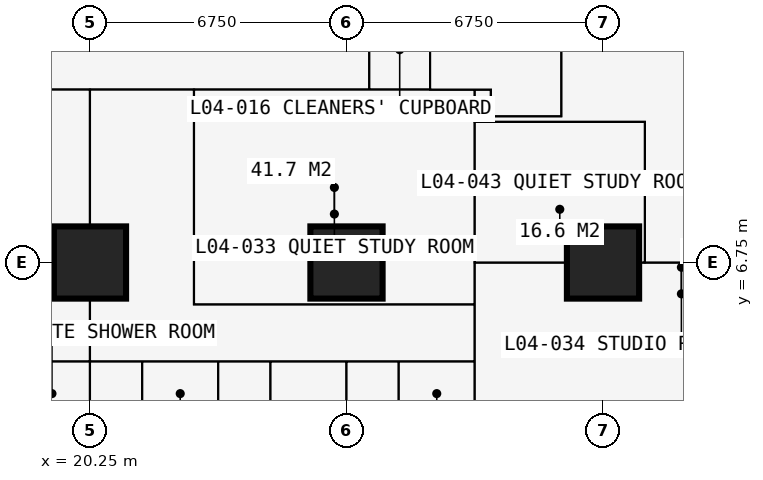
"""IFC4 building model, lengths in metres.
Left out: names, types, materials, properties, quantities, classifications, styles, units other than length and angle.
Written with IfcOpenShell. Run it as: python <this file> out.ifc"""

import sys

from ifc_helpers import new_model, si_unit, direction, frame, frame_2d, origin, origin_2d, place, context, subcontext, project, spatial, rectangle, extrude, element, fill, save


model = new_model("IFC4")
c1 = context("Model", 3, precision=1e-05, world=origin(), true_north=direction((0.0, 1.0)))
c2 = subcontext(c1, "Body", "Model", "MODEL_VIEW")
j1 = project(units=[si_unit("LENGTHUNIT", "METRE"), si_unit("PLANEANGLEUNIT", "RADIAN")], contexts=[c1])
p1 = place(None, origin())
s1 = spatial("IfcSite", under=j1, at=p1, CompositionType="ELEMENT")
p2 = place(p1, origin())
s2 = spatial("IfcBuilding", under=s1, at=p2, CompositionType="ELEMENT")
p3 = place(p2, frame((0.0, 0.0, 18.0)))
s3 = spatial("IfcBuildingStorey", under=s2, at=p3, CompositionType="ELEMENT", Elevation=18.0)
for number, where, z_axis, x_axis in (
    (1, (20.25, 6.75, 0.0), (0.0, 0.0, 1.0), (1.0, 0.0, 0.0)),
    (2, (27.0, 6.75, 0.0), (0.0, 0.0, 1.0), (1.0, 0.0, 0.0)),
    (3, (33.75, 6.75, 0.0), (0.0, 0.0, 1.0), (1.0, 0.0, 0.0)),
):
    element("IfcColumn", number, at=place(p3, frame(where, z_axis=z_axis, x_axis=x_axis)), inside=s3, PredefinedType="COLUMN", context=c2, shape_type="SweptSolid", body=[
        extrude(rectangle(XDim=1.9, YDim=1.9, at=origin_2d()), origin(), (0.0, 0.0, 1.0), 3.6),
    ])
p4 = place(p3, frame((6.75, 4.15, 0.0), z_axis=(0.0, 0.0, 1.0), x_axis=(1.0, 0.0, 0.0)))
e4 = element("IfcWall", 4, at=p4, inside=s3, PredefinedType="PARTITIONING", context=c2, shape_type="SweptSolid", body=[
    extrude(rectangle(XDim=23.625, YDim=0.1, at=frame_2d((11.812, 0.0))), origin(), (0.0, 0.0, 1.0), 3.375),
])
p5 = place(p4, frame((1.2, 0.0, 0.0)))
e5 = element("IfcOpeningElement", 5, at=p5, cuts=e4, PredefinedType="OPENING", context=c2, shape_type="SweptSolid", body=[
    extrude(rectangle(XDim=1.0, YDim=2.2, at=frame_2d((0.5, 1.1))), frame((0.0, 0.06, 0.0), z_axis=(0.0, -1.0, 0.0), x_axis=(1.0, 0.0, 0.0)), (0.0, 0.0, 1.0), 0.12),
])
p6 = place(p4, frame((3.575, 0.0, 0.0)))
e6 = element("IfcOpeningElement", 6, at=p6, cuts=e4, PredefinedType="OPENING", context=c2, shape_type="SweptSolid", body=[
    extrude(rectangle(XDim=0.95, YDim=2.2, at=frame_2d((0.475, 1.1))), frame((0.0, 0.06, 0.0), z_axis=(0.0, -1.0, 0.0), x_axis=(1.0, 0.0, 0.0)), (0.0, 0.0, 1.0), 0.12),
])
p7 = place(p4, frame((7.0, 0.0, 0.0)))
e7 = element("IfcOpeningElement", 7, at=p7, cuts=e4, PredefinedType="OPENING", context=c2, shape_type="SweptSolid", body=[
    extrude(rectangle(XDim=0.95, YDim=2.2, at=frame_2d((0.475, 1.1))), frame((0.0, 0.06, 0.0), z_axis=(0.0, -1.0, 0.0), x_axis=(1.0, 0.0, 0.0)), (0.0, 0.0, 1.0), 0.12),
])
p8 = place(p4, frame((10.375, 0.0, 0.0)))
e8 = element("IfcOpeningElement", 8, at=p8, cuts=e4, PredefinedType="OPENING", context=c2, shape_type="SweptSolid", body=[
    extrude(rectangle(XDim=0.95, YDim=2.2, at=frame_2d((0.475, 1.1))), frame((0.0, 0.06, 0.0), z_axis=(0.0, -1.0, 0.0), x_axis=(1.0, 0.0, 0.0)), (0.0, 0.0, 1.0), 0.12),
])
p9 = place(p4, frame((13.7, 0.0, 0.0)))
e9 = element("IfcOpeningElement", 9, at=p9, cuts=e4, PredefinedType="OPENING", context=c2, shape_type="SweptSolid", body=[
    extrude(rectangle(XDim=0.95, YDim=2.2, at=frame_2d((0.475, 1.1))), frame((0.0, 0.06, 0.0), z_axis=(0.0, -1.0, 0.0), x_axis=(1.0, 0.0, 0.0)), (0.0, 0.0, 1.0), 0.12),
])
p10 = place(p4, frame((17.125, 0.0, 0.0)))
e10 = element("IfcOpeningElement", 10, at=p10, cuts=e4, PredefinedType="OPENING", context=c2, shape_type="SweptSolid", body=[
    extrude(rectangle(XDim=0.95, YDim=2.2, at=frame_2d((0.475, 1.1))), frame((0.0, 0.06, 0.0), z_axis=(0.0, -1.0, 0.0), x_axis=(1.0, 0.0, 0.0)), (0.0, 0.0, 1.0), 0.12),
])
p11 = place(p4, frame((20.5, 0.0, 0.0)))
e11 = element("IfcOpeningElement", 11, at=p11, cuts=e4, PredefinedType="OPENING", context=c2, shape_type="SweptSolid", body=[
    extrude(rectangle(XDim=0.95, YDim=2.2, at=frame_2d((0.475, 1.1))), frame((0.0, 0.06, 0.0), z_axis=(0.0, -1.0, 0.0), x_axis=(1.0, 0.0, 0.0)), (0.0, 0.0, 1.0), 0.12),
])
p12 = place(p3, frame((10.125, 11.3, 0.0), z_axis=(0.0, 0.0, 1.0), x_axis=(1.0, 0.0, 0.0)))
e12 = element("IfcWall", 12, at=p12, inside=s3, PredefinedType="PARTITIONING", context=c2, shape_type="SweptSolid", body=[
    extrude(rectangle(XDim=20.675, YDim=0.15, at=frame_2d((10.337, 0.0))), origin(), (0.0, 0.0, 1.0), 3.375),
])
p13 = place(p12, frame((8.375, 0.0, 0.0)))
e13 = element("IfcOpeningElement", 13, at=p13, cuts=e12, PredefinedType="OPENING", context=c2, shape_type="SweptSolid", body=[
    extrude(rectangle(XDim=1.0, YDim=2.2, at=frame_2d((0.5, 1.1))), frame((0.0, 0.085, 0.0), z_axis=(0.0, -1.0, 0.0), x_axis=(1.0, 0.0, 0.0)), (0.0, 0.0, 1.0), 0.17),
])
p14 = place(p12, frame((10.975, 0.0, 0.0)))
e14 = element("IfcOpeningElement", 14, at=p14, cuts=e12, PredefinedType="OPENING", context=c2, shape_type="SweptSolid", body=[
    extrude(rectangle(XDim=1.0, YDim=2.2, at=frame_2d((0.5, 1.1))), frame((0.0, 0.085, 0.0), z_axis=(0.0, -1.0, 0.0), x_axis=(1.0, 0.0, 0.0)), (0.0, 0.0, 1.0), 0.17),
])
p15 = place(p12, frame((3.925, 0.0, 0.0)))
e15 = element("IfcOpeningElement", 15, at=p15, cuts=e12, PredefinedType="OPENING", context=c2, shape_type="SweptSolid", body=[
    extrude(rectangle(XDim=0.95, YDim=2.2, at=frame_2d((0.475, 1.1))), frame((0.0, 0.085, 0.0), z_axis=(0.0, -1.0, 0.0), x_axis=(1.0, 0.0, 0.0)), (0.0, 0.0, 1.0), 0.17),
])
p16 = place(p3, frame((20.25, -0.734, 0.0), z_axis=(0.0, 0.0, 1.0), x_axis=(0.0, 1.0, 0.0)))
e16 = element("IfcWall", 16, at=p16, inside=s3, PredefinedType="PARTITIONING", context=c2, shape_type="SweptSolid", body=[
    extrude(rectangle(XDim=12.034, YDim=0.15, at=frame_2d((6.017, 0.0))), origin(), (0.0, 0.0, 1.0), 2.61),
])
p17 = place(p3, frame((21.625, 1.95, 0.0), z_axis=(0.0, 0.0, 1.0), x_axis=(0.0, 1.0, 0.0)))
e17 = element("IfcWall", 17, at=p17, inside=s3, PredefinedType="PARTITIONING", context=c2, shape_type="SweptSolid", body=[
    extrude(rectangle(XDim=2.2, YDim=0.1, at=frame_2d((1.1, 0.0))), origin(), (0.0, 0.0, 1.0), 3.375),
])
p18 = place(p17, frame((0.65, 0.0, 0.0)))
e18 = element("IfcOpeningElement", 18, at=p18, cuts=e17, PredefinedType="OPENING", context=c2, shape_type="SweptSolid", body=[
    extrude(rectangle(XDim=0.9, YDim=2.2, at=frame_2d((0.45, 1.1))), frame((0.0, 0.06, 0.0), z_axis=(0.0, -1.0, 0.0), x_axis=(1.0, 0.0, 0.0)), (0.0, 0.0, 1.0), 0.12),
])
p19 = place(p3, frame((22.988, 5.65, 0.0), z_axis=(0.0, 0.0, 1.0), x_axis=(1.0, 0.0, 0.0)))
e19 = element("IfcWall", 19, at=p19, inside=s3, PredefinedType="PARTITIONING", context=c2, shape_type="SweptSolid", body=[
    extrude(rectangle(XDim=7.387, YDim=0.15, at=frame_2d((3.694, 0.0))), origin(), (0.0, 0.0, 1.0), 3.375),
])
p20 = place(p19, frame((2.1, 0.0, 0.0)))
e20 = element("IfcOpeningElement", 20, at=p20, cuts=e19, PredefinedType="OPENING", context=c2, shape_type="SweptSolid", body=[
    extrude(rectangle(XDim=0.95, YDim=2.2, at=frame_2d((0.475, 1.1))), frame((0.0, 0.085, 0.0), z_axis=(0.0, -1.0, 0.0), x_axis=(1.0, 0.0, 0.0)), (0.0, 0.0, 1.0), 0.17),
])
p21 = place(p3, frame((22.988, 5.65, 0.0), z_axis=(0.0, 0.0, 1.0), x_axis=(0.0, 1.0, 0.0)))
e21 = element("IfcWall", 21, at=p21, inside=s3, PredefinedType="PARTITIONING", context=c2, shape_type="SweptSolid", body=[
    extrude(rectangle(XDim=5.65, YDim=0.15, at=frame_2d((2.825, 0.0))), origin(), (0.0, 0.0, 1.0), 3.375),
])
p22 = place(p3, frame((23.625, -0.734, 0.0), z_axis=(0.0, 0.0, 1.0), x_axis=(0.0, 1.0, 0.0)))
e22 = element("IfcWall", 22, at=p22, inside=s3, PredefinedType="PARTITIONING", context=c2, shape_type="SweptSolid", body=[
    extrude(rectangle(XDim=4.884, YDim=0.175, at=frame_2d((2.442, 0.0))), origin(), (0.0, 0.0, 1.0), 3.375),
])
p23 = place(p3, frame((25.0, 1.95, 0.0), z_axis=(0.0, 0.0, 1.0), x_axis=(0.0, 1.0, 0.0)))
e23 = element("IfcWall", 23, at=p23, inside=s3, PredefinedType="PARTITIONING", context=c2, shape_type="SweptSolid", body=[
    extrude(rectangle(XDim=2.2, YDim=0.1, at=frame_2d((1.1, 0.0))), origin(), (0.0, 0.0, 1.0), 3.375),
])
p24 = place(p23, frame((0.65, 0.0, 0.0)))
e24 = element("IfcOpeningElement", 24, at=p24, cuts=e23, PredefinedType="OPENING", context=c2, shape_type="SweptSolid", body=[
    extrude(rectangle(XDim=0.9, YDim=2.2, at=frame_2d((0.45, 1.1))), frame((0.0, 0.06, 0.0), z_axis=(0.0, -1.0, 0.0), x_axis=(1.0, 0.0, 0.0)), (0.0, 0.0, 1.0), 0.12),
])
p25 = place(p3, frame((27.0, -0.734, 0.0), z_axis=(0.0, 0.0, 1.0), x_axis=(0.0, 1.0, 0.0)))
e25 = element("IfcWall", 25, at=p25, inside=s3, PredefinedType="PARTITIONING", context=c2, shape_type="SweptSolid", body=[
    extrude(rectangle(XDim=4.884, YDim=0.175, at=frame_2d((2.442, 0.0))), origin(), (0.0, 0.0, 1.0), 2.61),
])
p26 = place(p3, frame((27.6, 11.3, 0.0), z_axis=(0.0, 0.0, 1.0), x_axis=(0.0, 1.0, 0.0)))
e26 = element("IfcWall", 26, at=p26, inside=s3, PredefinedType="PARTITIONING", context=c2, shape_type="SweptSolid", body=[
    extrude(rectangle(XDim=1.6, YDim=0.15, at=frame_2d((0.8, 0.0))), origin(), (0.0, 0.0, 1.0), 3.375),
])
p27 = place(p26, frame((0.3, 0.0, 0.0)))
e27 = element("IfcOpeningElement", 27, at=p27, cuts=e26, PredefinedType="OPENING", context=c2, shape_type="SweptSolid", body=[
    extrude(rectangle(XDim=0.95, YDim=2.2, at=frame_2d((0.475, 1.1))), frame((0.0, 0.085, 0.0), z_axis=(0.0, -1.0, 0.0), x_axis=(1.0, 0.0, 0.0)), (0.0, 0.0, 1.0), 0.17),
])
p28 = place(p3, frame((28.375, 1.95, 0.0), z_axis=(0.0, 0.0, 1.0), x_axis=(0.0, 1.0, 0.0)))
e28 = element("IfcWall", 28, at=p28, inside=s3, PredefinedType="PARTITIONING", context=c2, shape_type="SweptSolid", body=[
    extrude(rectangle(XDim=2.2, YDim=0.1, at=frame_2d((1.1, 0.0))), origin(), (0.0, 0.0, 1.0), 3.375),
])
p29 = place(p28, frame((0.65, 0.0, 0.0)))
e29 = element("IfcOpeningElement", 29, at=p29, cuts=e28, PredefinedType="OPENING", context=c2, shape_type="SweptSolid", body=[
    extrude(rectangle(XDim=0.9, YDim=2.2, at=frame_2d((0.45, 1.1))), frame((0.0, 0.06, 0.0), z_axis=(0.0, -1.0, 0.0), x_axis=(1.0, 0.0, 0.0)), (0.0, 0.0, 1.0), 0.12),
])
p30 = place(p3, frame((29.2, 11.3, 0.0), z_axis=(0.0, 0.0, 1.0), x_axis=(0.0, 1.0, 0.0)))
e30 = element("IfcWall", 30, at=p30, inside=s3, PredefinedType="PARTITIONING", context=c2, shape_type="SweptSolid", body=[
    extrude(rectangle(XDim=17.9, YDim=0.2, at=frame_2d((8.95, 0.0))), origin(), (0.0, 0.0, 1.0), 3.375),
])
p31 = place(p30, frame((8.35, 0.0, 0.0)))
e31 = element("IfcOpeningElement", 31, at=p31, cuts=e30, PredefinedType="OPENING", context=c2, shape_type="SweptSolid", body=[
    extrude(rectangle(XDim=1.2, YDim=2.2, at=frame_2d((0.6, 1.1))), frame((0.0, 0.11, 0.0), z_axis=(0.0, -1.0, 0.0), x_axis=(1.0, 0.0, 0.0)), (0.0, 0.0, 1.0), 0.22),
])
p32 = place(p3, frame((30.375, -0.734, 0.0), z_axis=(0.0, 0.0, 1.0), x_axis=(0.0, 1.0, 0.0)))
e32 = element("IfcWall", 32, at=p32, inside=s3, PredefinedType="PARTITIONING", context=c2, shape_type="SweptSolid", body=[
    extrude(rectangle(XDim=12.034, YDim=0.15, at=frame_2d((6.017, 0.0))), origin(), (0.0, 0.0, 1.0), 3.375),
])
p33 = place(p32, frame((5.134, 0.0, 0.0)))
e33 = element("IfcOpeningElement", 33, at=p33, cuts=e32, PredefinedType="OPENING", context=c2, shape_type="SweptSolid", body=[
    extrude(rectangle(XDim=1.0, YDim=2.2, at=frame_2d((0.5, 1.1))), frame((0.0, 0.085, 0.0), z_axis=(0.0, -1.0, 0.0), x_axis=(1.0, 0.0, 0.0)), (0.0, 0.0, 1.0), 0.17),
])
p34 = place(p3, frame((30.375, 6.75, 0.0), z_axis=(0.0, 0.0, 1.0), x_axis=(1.0, 0.0, 0.0)))
e34 = element("IfcWall", 34, at=p34, inside=s3, PredefinedType="PARTITIONING", context=c2, shape_type="SweptSolid", body=[
    extrude(rectangle(XDim=5.975, YDim=0.15, at=frame_2d((2.988, 0.0))), origin(), (0.0, 0.0, 1.0), 2.877),
])
p35 = place(p3, frame((30.375, 10.45, 0.0), z_axis=(0.0, 0.0, 1.0), x_axis=(1.0, 0.0, 0.0)))
e35 = element("IfcWall", 35, at=p35, inside=s3, PredefinedType="PARTITIONING", context=c2, shape_type="SweptSolid", body=[
    extrude(rectangle(XDim=4.475, YDim=0.15, at=frame_2d((2.238, 0.0))), origin(), (0.0, 0.0, 1.0), 3.375),
])
p36 = place(p35, frame((2.35, 0.0, 0.0)))
e36 = element("IfcOpeningElement", 36, at=p36, cuts=e35, PredefinedType="OPENING", context=c2, shape_type="SweptSolid", body=[
    extrude(rectangle(XDim=0.95, YDim=2.2, at=frame_2d((0.475, 1.1))), frame((0.0, 0.085, 0.0), z_axis=(0.0, -1.0, 0.0), x_axis=(1.0, 0.0, 0.0)), (0.0, 0.0, 1.0), 0.17),
])
p37 = place(p3, frame((30.8, 10.6, 0.0), z_axis=(0.0, 0.0, 1.0), x_axis=(0.0, 1.0, 0.0)))
e37 = element("IfcWall", 37, at=p37, inside=s3, PredefinedType="PARTITIONING", context=c2, shape_type="SweptSolid", body=[
    extrude(rectangle(XDim=0.7, YDim=0.15, at=frame_2d((0.35, 0.0))), origin(), (0.0, 0.0, 1.0), 3.375),
])
p38 = place(p3, frame((30.8, 10.6, 0.0), z_axis=(0.0, 0.0, 1.0), x_axis=(1.0, 0.0, 0.0)))
e38 = element("IfcWall", 38, at=p38, inside=s3, PredefinedType="PARTITIONING", context=c2, shape_type="SweptSolid", body=[
    extrude(rectangle(XDim=1.85, YDim=0.15, at=frame_2d((0.925, 0.0))), origin(), (0.0, 0.0, 1.0), 3.375),
])
p39 = place(p3, frame((32.65, 10.6, 0.0), z_axis=(0.0, 0.0, 1.0), x_axis=(0.0, 1.0, 0.0)))
e39 = element("IfcWall", 39, at=p39, inside=s3, PredefinedType="SHEAR", context=c2, shape_type="SweptSolid", body=[
    extrude(rectangle(XDim=9.3, YDim=0.1, at=frame_2d((4.65, 0.0))), origin(), (0.0, 0.0, 1.0), 3.375),
])
p40 = place(p39, frame((0.5, 0.0, 0.0)))
e40 = element("IfcOpeningElement", 40, at=p40, cuts=e39, PredefinedType="OPENING", context=c2, shape_type="SweptSolid", body=[
    extrude(rectangle(XDim=1.0, YDim=2.2, at=frame_2d((0.5, 1.1))), frame((0.0, 0.06, 0.0), z_axis=(0.0, -1.0, 0.0), x_axis=(1.0, 0.0, 0.0)), (0.0, 0.0, 1.0), 0.12),
])
p41 = place(p3, frame((34.85, 6.75, 0.0), z_axis=(0.0, 0.0, 1.0), x_axis=(0.0, 1.0, 0.0)))
e41 = element("IfcWall", 41, at=p41, inside=s3, PredefinedType="PARTITIONING", context=c2, shape_type="SweptSolid", body=[
    extrude(rectangle(XDim=3.7, YDim=0.15, at=frame_2d((1.85, 0.0))), origin(), (0.0, 0.0, 1.0), 3.375),
])
p42 = place(p27, origin())
e42 = element("IfcDoor", 42, at=p42, inside=s3, OperationType="SINGLE_SWING_LEFT", PredefinedType="DOOR", context=c2, shape_type="SweptSolid", body=[
    extrude(rectangle(XDim=0.95, YDim=2.2, at=frame_2d((0.475, 1.1))), frame((0.0, 0.025, 0.0), z_axis=(0.0, -1.0, 0.0), x_axis=(1.0, 0.0, 0.0)), (0.0, 0.0, 1.0), 0.05),
])
fill(e27, e42)
p43 = place(p13, origin())
e43 = element("IfcDoor", 43, at=p43, inside=s3, OperationType="SINGLE_SWING_LEFT", PredefinedType="DOOR", context=c2, shape_type="SweptSolid", body=[
    extrude(rectangle(XDim=1.0, YDim=2.2, at=frame_2d((0.5, 1.1))), frame((0.0, 0.025, 0.0), z_axis=(0.0, -1.0, 0.0), x_axis=(1.0, 0.0, 0.0)), (0.0, 0.0, 1.0), 0.05),
])
fill(e13, e43)
p44 = place(p9, origin())
e44 = element("IfcDoor", 44, at=p44, inside=s3, OperationType="SINGLE_SWING_LEFT", PredefinedType="DOOR", context=c2, shape_type="SweptSolid", body=[
    extrude(rectangle(XDim=0.95, YDim=2.2, at=frame_2d((0.475, 1.1))), frame((0.0, 0.025, 0.0), z_axis=(0.0, -1.0, 0.0), x_axis=(1.0, 0.0, 0.0)), (0.0, 0.0, 1.0), 0.05),
])
fill(e9, e44)
p45 = place(p18, origin())
e45 = element("IfcDoor", 45, at=p45, inside=s3, OperationType="SINGLE_SWING_RIGHT", PredefinedType="DOOR", context=c2, shape_type="SweptSolid", body=[
    extrude(rectangle(XDim=0.9, YDim=2.2, at=frame_2d((0.45, 1.1))), frame((0.0, 0.025, 0.0), z_axis=(0.0, -1.0, 0.0), x_axis=(1.0, 0.0, 0.0)), (0.0, 0.0, 1.0), 0.05),
])
fill(e18, e45)
p46 = place(p10, origin())
e46 = element("IfcDoor", 46, at=p46, inside=s3, OperationType="SINGLE_SWING_LEFT", PredefinedType="DOOR", context=c2, shape_type="SweptSolid", body=[
    extrude(rectangle(XDim=0.95, YDim=2.2, at=frame_2d((0.475, 1.1))), frame((0.0, 0.025, 0.0), z_axis=(0.0, -1.0, 0.0), x_axis=(1.0, 0.0, 0.0)), (0.0, 0.0, 1.0), 0.05),
])
fill(e10, e46)
p47 = place(p24, origin())
e47 = element("IfcDoor", 47, at=p47, inside=s3, OperationType="SINGLE_SWING_RIGHT", PredefinedType="DOOR", context=c2, shape_type="SweptSolid", body=[
    extrude(rectangle(XDim=0.9, YDim=2.2, at=frame_2d((0.45, 1.1))), frame((0.0, 0.025, 0.0), z_axis=(0.0, -1.0, 0.0), x_axis=(1.0, 0.0, 0.0)), (0.0, 0.0, 1.0), 0.05),
])
fill(e24, e47)
p48 = place(p11, origin())
e48 = element("IfcDoor", 48, at=p48, inside=s3, OperationType="SINGLE_SWING_LEFT", PredefinedType="DOOR", context=c2, shape_type="SweptSolid", body=[
    extrude(rectangle(XDim=0.95, YDim=2.2, at=frame_2d((0.475, 1.1))), frame((0.0, 0.025, 0.0), z_axis=(0.0, -1.0, 0.0), x_axis=(1.0, 0.0, 0.0)), (0.0, 0.0, 1.0), 0.05),
])
fill(e11, e48)
p49 = place(p29, origin())
e49 = element("IfcDoor", 49, at=p49, inside=s3, OperationType="SINGLE_SWING_RIGHT", PredefinedType="DOOR", context=c2, shape_type="SweptSolid", body=[
    extrude(rectangle(XDim=0.9, YDim=2.2, at=frame_2d((0.45, 1.1))), frame((0.0, 0.025, 0.0), z_axis=(0.0, -1.0, 0.0), x_axis=(1.0, 0.0, 0.0)), (0.0, 0.0, 1.0), 0.05),
])
fill(e29, e49)
p50 = place(p14, origin())
e50 = element("IfcDoor", 50, at=p50, inside=s3, OperationType="SINGLE_SWING_LEFT", PredefinedType="DOOR", context=c2, shape_type="SweptSolid", body=[
    extrude(rectangle(XDim=1.0, YDim=2.2, at=frame_2d((0.5, 1.1))), frame((0.0, 0.025, 0.0), z_axis=(0.0, -1.0, 0.0), x_axis=(1.0, 0.0, 0.0)), (0.0, 0.0, 1.0), 0.05),
])
fill(e14, e50)
p51 = place(p20, origin())
e51 = element("IfcDoor", 51, at=p51, inside=s3, OperationType="SINGLE_SWING_LEFT", PredefinedType="DOOR", context=c2, shape_type="SweptSolid", body=[
    extrude(rectangle(XDim=0.95, YDim=2.2, at=frame_2d((0.475, 1.1))), frame((0.0, 0.025, 0.0), z_axis=(0.0, -1.0, 0.0), x_axis=(1.0, 0.0, 0.0)), (0.0, 0.0, 1.0), 0.05),
])
fill(e20, e51)
p52 = place(p33, origin())
e52 = element("IfcDoor", 52, at=p52, inside=s3, OperationType="SINGLE_SWING_LEFT", PredefinedType="DOOR", context=c2, shape_type="SweptSolid", body=[
    extrude(rectangle(XDim=1.0, YDim=2.2, at=frame_2d((0.5, 1.1))), frame((0.0, 0.025, 0.0), z_axis=(0.0, -1.0, 0.0), x_axis=(1.0, 0.0, 0.0)), (0.0, 0.0, 1.0), 0.05),
])
fill(e33, e52)
p53 = place(p40, origin())
e53 = element("IfcDoor", 53, at=p53, inside=s3, OperationType="SINGLE_SWING_LEFT", PredefinedType="DOOR", context=c2, shape_type="SweptSolid", body=[
    extrude(rectangle(XDim=1.0, YDim=2.2, at=frame_2d((0.5, 1.1))), frame((0.0, 0.025, 0.0), z_axis=(0.0, -1.0, 0.0), x_axis=(1.0, 0.0, 0.0)), (0.0, 0.0, 1.0), 0.05),
])
fill(e40, e53)
p54 = place(p36, origin())
e54 = element("IfcDoor", 54, at=p54, inside=s3, OperationType="SINGLE_SWING_LEFT", PredefinedType="DOOR", context=c2, shape_type="SweptSolid", body=[
    extrude(rectangle(XDim=0.95, YDim=2.2, at=frame_2d((0.475, 1.1))), frame((0.0, 0.025, 0.0), z_axis=(0.0, -1.0, 0.0), x_axis=(1.0, 0.0, 0.0)), (0.0, 0.0, 1.0), 0.05),
])
fill(e36, e54)
save(model, sys.argv[1])
